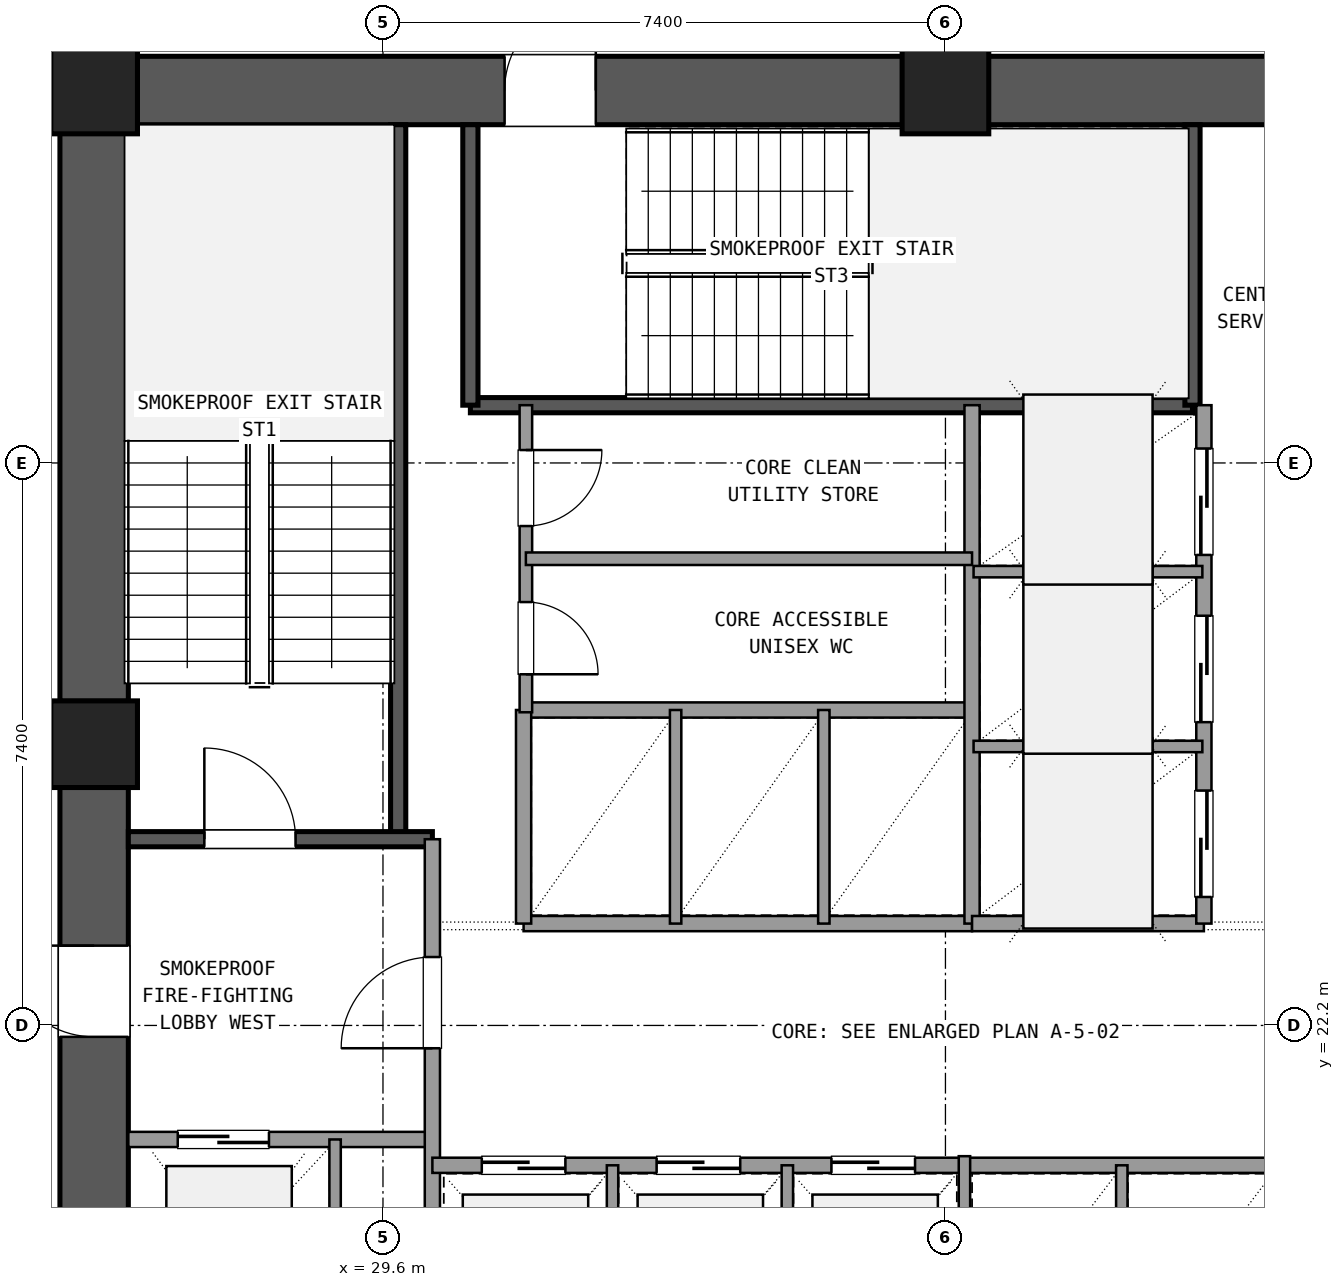
"""IFC4 building model, lengths in metres.
Left out: names, types, materials, properties, quantities, classifications, styles, units other than length and angle.
Written with IfcOpenShell. Run it as: python <this file> out.ifc"""

import sys

from ifc_helpers import new_model, si_unit, direction, frame, frame_2d, origin, origin_2d, place, context, subcontext, project, spatial, rectangle, extrude, element, fill, save


model = new_model("IFC4")
c1 = context("Model", 3, precision=1e-05, world=origin(), true_north=direction((0.0, 1.0)))
c2 = subcontext(c1, "Body", "Model", "MODEL_VIEW")
j1 = project(units=[si_unit("LENGTHUNIT", "METRE"), si_unit("PLANEANGLEUNIT", "RADIAN")], contexts=[c1])
p1 = place(None, origin())
s1 = spatial("IfcSite", under=j1, at=p1, CompositionType="ELEMENT")
p2 = place(p1, origin())
s2 = spatial("IfcBuilding", under=s1, at=p2, CompositionType="ELEMENT")
p3 = place(p2, frame((0.0, 0.0, 5.4)))
s3 = spatial("IfcBuildingStorey", under=s2, at=p3, CompositionType="ELEMENT", Elevation=5.4)
for number, where, z_axis, x_axis in (
    (1, (37.0, 34.5, 0.0), (0.0, 0.0, 1.0), (1.0, 0.0, 0.0)),
    (2, (25.8, 34.5, 0.0), (0.0, 0.0, 1.0), (1.0, 0.0, 0.0)),
    (3, (25.8, 25.9, 0.0), (0.0, 0.0, 1.0), (1.0, 0.0, 0.0)),
):
    element("IfcColumn", number, at=place(p3, frame(where, z_axis=z_axis, x_axis=x_axis)), inside=s3, PredefinedType="COLUMN", context=c2, shape_type="SweptSolid", body=[
        extrude(rectangle(XDim=1.14, YDim=1.14, at=origin_2d()), origin(), (0.0, 0.0, 1.0), 4.5),
    ])
p4 = place(p3, frame((47.635, 34.5, 0.0), z_axis=(0.0, 0.0, 1.0), x_axis=(-1.0, 0.0, 0.0)))
e4 = element("IfcWall", 4, at=p4, inside=s3, PredefinedType="SHEAR", context=c2, shape_type="SweptSolid", body=[
    extrude(rectangle(XDim=10.07, YDim=0.9, at=frame_2d((5.035, 0.0))), origin(), (0.0, 0.0, 1.0), 4.2),
])
p5 = place(p4, frame((4.535, 0.0, 0.0)))
e5 = element("IfcOpeningElement", 5, at=p5, cuts=e4, PredefinedType="OPENING", context=c2, shape_type="SweptSolid", body=[
    extrude(rectangle(XDim=1.6, YDim=2.2, at=frame_2d((0.8, 1.1))), frame((0.0, 0.46, 0.0), z_axis=(0.0, -1.0, 0.0), x_axis=(1.0, 0.0, 0.0)), (0.0, 0.0, 1.0), 0.92),
])
p6 = place(p3, frame((36.435, 34.5, 0.0), z_axis=(0.0, 0.0, 1.0), x_axis=(-1.0, 0.0, 0.0)))
e6 = element("IfcWall", 6, at=p6, inside=s3, PredefinedType="SHEAR", context=c2, shape_type="SweptSolid", body=[
    extrude(rectangle(XDim=10.07, YDim=0.9, at=frame_2d((5.035, 0.0))), origin(), (0.0, 0.0, 1.0), 4.2),
])
p7 = place(p6, frame((4.035, 0.0, 0.0)))
e7 = element("IfcOpeningElement", 7, at=p7, cuts=e6, PredefinedType="OPENING", context=c2, shape_type="SweptSolid", body=[
    extrude(rectangle(XDim=1.2, YDim=2.15, at=frame_2d((0.6, 1.075))), frame((0.0, 0.46, 0.0), z_axis=(0.0, -1.0, 0.0), x_axis=(1.0, 0.0, 0.0)), (0.0, 0.0, 1.0), 0.92),
])
p8 = place(p3, frame((25.8, 33.935, 0.0), z_axis=(0.0, 0.0, 1.0), x_axis=(0.0, -1.0, 0.0)))
e8 = element("IfcWall", 8, at=p8, inside=s3, PredefinedType="SHEAR", context=c2, shape_type="SweptSolid", body=[
    extrude(rectangle(XDim=7.47, YDim=0.9, at=frame_2d((3.735, 0.0))), origin(), (0.0, 0.0, 1.0), 4.2),
])
p9 = place(p3, frame((25.8, 25.335, 0.0), z_axis=(0.0, 0.0, 1.0), x_axis=(0.0, -1.0, 0.0)))
e9 = element("IfcWall", 9, at=p9, inside=s3, PredefinedType="SHEAR", context=c2, shape_type="SweptSolid", body=[
    extrude(rectangle(XDim=7.47, YDim=0.9, at=frame_2d((3.735, 0.0))), origin(), (0.0, 0.0, 1.0), 4.2),
])
p10 = place(p9, frame((2.085, 0.0, 0.0)))
e10 = element("IfcOpeningElement", 10, at=p10, cuts=e9, PredefinedType="OPENING", context=c2, shape_type="SweptSolid", body=[
    extrude(rectangle(XDim=1.2, YDim=2.15, at=frame_2d((0.6, 1.075))), frame((0.0, 0.46, 0.0), z_axis=(0.0, -1.0, 0.0), x_axis=(1.0, 0.0, 0.0)), (0.0, 0.0, 1.0), 0.92),
])
p11 = place(p3, frame((29.8, 24.65, 0.0), z_axis=(0.0, 0.0, 1.0), x_axis=(0.0, 1.0, 0.0)))
e11 = element("IfcWall", 11, at=p11, inside=s3, PredefinedType="SHEAR", context=c2, shape_type="SweptSolid", body=[
    extrude(rectangle(XDim=9.4, YDim=0.2, at=frame_2d((4.7, 0.0))), origin(), (0.0, 0.0, 1.0), 4.2),
])
p12 = place(p3, frame((26.25, 24.65, 0.0), z_axis=(0.0, 0.0, 1.0), x_axis=(1.0, 0.0, 0.0)))
e12 = element("IfcWall", 12, at=p12, inside=s3, PredefinedType="SHEAR", context=c2, shape_type="SweptSolid", body=[
    extrude(rectangle(XDim=4.0, YDim=0.2, at=frame_2d((2.0, 0.0))), origin(), (0.0, 0.0, 1.0), 4.2),
])
p13 = place(p12, frame((1.0, 0.0, 0.0)))
e13 = element("IfcOpeningElement", 13, at=p13, cuts=e12, PredefinedType="OPENING", context=c2, shape_type="SweptSolid", body=[
    extrude(rectangle(XDim=1.2, YDim=2.15, at=frame_2d((0.6, 1.075))), frame((0.0, 0.11, 0.0), z_axis=(0.0, -1.0, 0.0), x_axis=(1.0, 0.0, 0.0)), (0.0, 0.0, 1.0), 0.22),
])
p14 = place(p3, frame((30.75, 30.36, 0.0), z_axis=(0.0, 0.0, 1.0), x_axis=(1.0, 0.0, 0.0)))
e14 = element("IfcWall", 14, at=p14, inside=s3, PredefinedType="SHEAR", context=c2, shape_type="SweptSolid", body=[
    extrude(rectangle(XDim=9.5, YDim=0.2, at=frame_2d((4.75, 0.0))), origin(), (0.0, 0.0, 1.0), 4.2),
])
for number, where, z_axis, x_axis in (
    (15, (30.75, 30.36, 0.0), (0.0, 0.0, 1.0), (0.0, 1.0, 0.0)),
    (16, (40.25, 30.36, 0.0), (0.0, 0.0, 1.0), (0.0, 1.0, 0.0)),
):
    element("IfcWall", number, at=place(p3, frame(where, z_axis=z_axis, x_axis=x_axis)), inside=s3, PredefinedType="SHEAR", context=c2, shape_type="SweptSolid", body=[
        extrude(rectangle(XDim=3.69, YDim=0.2, at=frame_2d((1.845, 0.0))), origin(), (0.0, 0.0, 1.0), 4.2),
    ])
p15 = place(p3, frame((26.25, 20.7, 0.0), z_axis=(0.0, 0.0, 1.0), x_axis=(1.0, 0.0, 0.0)))
e17 = element("IfcWall", 17, at=p15, inside=s3, PredefinedType="SOLIDWALL", context=c2, shape_type="SweptSolid", body=[
    extrude(rectangle(XDim=4.0, YDim=0.2, at=frame_2d((2.0, 0.0))), origin(), (0.0, 0.0, 1.0), 3.21),
])
p16 = place(p15, frame((0.65, 0.0, 0.0)))
e18 = element("IfcOpeningElement", 18, at=p16, cuts=e17, PredefinedType="OPENING", context=c2, shape_type="SweptSolid", body=[
    extrude(rectangle(XDim=1.2, YDim=2.15, at=frame_2d((0.6, 1.075))), frame((0.0, 0.11, 0.0), z_axis=(0.0, -1.0, 0.0), x_axis=(1.0, 0.0, 0.0)), (0.0, 0.0, 1.0), 0.22),
])
p17 = place(p3, frame((30.25, 17.75, 0.0), z_axis=(0.0, 0.0, 1.0), x_axis=(0.0, 1.0, 0.0)))
e19 = element("IfcWall", 19, at=p17, inside=s3, PredefinedType="SOLIDWALL", context=c2, shape_type="SweptSolid", body=[
    extrude(rectangle(XDim=6.9, YDim=0.2, at=frame_2d((3.45, 0.0))), origin(), (0.0, 0.0, 1.0), 3.21),
])
p18 = place(p17, frame((4.15, 0.0, 0.0)))
e20 = element("IfcOpeningElement", 20, at=p18, cuts=e19, PredefinedType="OPENING", context=c2, shape_type="SweptSolid", body=[
    extrude(rectangle(XDim=1.2, YDim=2.15, at=frame_2d((0.6, 1.075))), frame((0.0, 0.11, 0.0), z_axis=(0.0, -1.0, 0.0), x_axis=(1.0, 0.0, 0.0)), (0.0, 0.0, 1.0), 0.22),
])
p19 = place(p3, frame((28.97, 17.75, 0.0), z_axis=(0.0, 0.0, 1.0), x_axis=(0.0, 1.0, 0.0)))
e21 = element("IfcWall", 21, at=p19, inside=s3, PredefinedType="PARTITIONING", context=c2, shape_type="SweptSolid", body=[
    extrude(rectangle(XDim=2.95, YDim=0.15, at=frame_2d((1.475, 0.0))), origin(), (0.0, 0.0, 1.0), 3.21),
])
p20 = place(p3, frame((30.25, 20.36, 0.0), z_axis=(0.0, 0.0, 1.0), x_axis=(1.0, 0.0, 0.0)))
e22 = element("IfcWall", 22, at=p20, inside=s3, PredefinedType="SOLIDWALL", context=c2, shape_type="SweptSolid", body=[
    extrude(rectangle(XDim=7.0, YDim=0.2, at=frame_2d((3.5, 0.0))), origin(), (0.0, 0.0, 1.0), 3.21),
])
p21 = place(p20, frame((0.65, 0.0, 0.0)))
e23 = element("IfcOpeningElement", 23, at=p21, cuts=e22, PredefinedType="OPENING", context=c2, shape_type="SweptSolid", body=[
    extrude(rectangle(XDim=1.1, YDim=2.15, at=frame_2d((0.55, 1.075))), frame((0.0, 0.11, 0.0), z_axis=(0.0, -1.0, 0.0), x_axis=(1.0, 0.0, 0.0)), (0.0, 0.0, 1.0), 0.22),
])
p22 = place(p20, frame((2.95, 0.0, 0.0)))
e24 = element("IfcOpeningElement", 24, at=p22, cuts=e22, PredefinedType="OPENING", context=c2, shape_type="SweptSolid", body=[
    extrude(rectangle(XDim=1.1, YDim=2.15, at=frame_2d((0.55, 1.075))), frame((0.0, 0.11, 0.0), z_axis=(0.0, -1.0, 0.0), x_axis=(1.0, 0.0, 0.0)), (0.0, 0.0, 1.0), 0.22),
])
p23 = place(p20, frame((5.25, 0.0, 0.0)))
e25 = element("IfcOpeningElement", 25, at=p23, cuts=e22, PredefinedType="OPENING", context=c2, shape_type="SweptSolid", body=[
    extrude(rectangle(XDim=1.1, YDim=2.15, at=frame_2d((0.55, 1.075))), frame((0.0, 0.11, 0.0), z_axis=(0.0, -1.0, 0.0), x_axis=(1.0, 0.0, 0.0)), (0.0, 0.0, 1.0), 0.22),
])
for number, where, z_axis, x_axis in (
    (26, (32.62, 17.75, 0.0), (0.0, 0.0, 1.0), (0.0, 1.0, 0.0)),
    (27, (34.92, 17.75, 0.0), (0.0, 0.0, 1.0), (0.0, 1.0, 0.0)),
):
    element("IfcWall", number, at=place(p3, frame(where, z_axis=z_axis, x_axis=x_axis)), inside=s3, PredefinedType="PARTITIONING", context=c2, shape_type="SweptSolid", body=[
        extrude(rectangle(XDim=2.61, YDim=0.15, at=frame_2d((1.305, 0.0))), origin(), (0.0, 0.0, 1.0), 3.21),
    ])
p24 = place(p3, frame((37.25, 20.36, 0.0), z_axis=(0.0, 0.0, 1.0), x_axis=(1.0, 0.0, 0.0)))
e28 = element("IfcWall", 28, at=p24, inside=s3, PredefinedType="SOLIDWALL", context=c2, shape_type="SweptSolid", body=[
    extrude(rectangle(XDim=6.1, YDim=0.2, at=frame_2d((3.05, 0.0))), origin(), (0.0, 0.0, 1.0), 3.21),
])
p25 = place(p3, frame((39.32, 17.75, 0.0), z_axis=(0.0, 0.0, 1.0), x_axis=(0.0, 1.0, 0.0)))
e29 = element("IfcWall", 29, at=p25, inside=s3, PredefinedType="PARTITIONING", context=c2, shape_type="SweptSolid", body=[
    extrude(rectangle(XDim=2.61, YDim=0.15, at=frame_2d((1.305, 0.0))), origin(), (0.0, 0.0, 1.0), 3.21),
])
p26 = place(p3, frame((37.25, 17.75, 0.0), z_axis=(0.0, 0.0, 1.0), x_axis=(0.0, 1.0, 0.0)))
e30 = element("IfcWall", 30, at=p26, inside=s3, PredefinedType="PARTITIONING", context=c2, shape_type="SweptSolid", body=[
    extrude(rectangle(XDim=2.73, YDim=0.15, at=frame_2d((1.365, 0.0))), origin(), (0.0, 0.0, 1.0), 3.21),
])
for number, where, z_axis, x_axis in (
    (31, (31.45, 23.54, 0.0), (0.0, 0.0, 1.0), (1.0, 0.0, 0.0)),
    (32, (31.45, 26.35, 0.0), (0.0, 0.0, 1.0), (1.0, 0.0, 0.0)),
):
    element("IfcWall", number, at=place(p3, frame(where, z_axis=z_axis, x_axis=x_axis)), inside=s3, PredefinedType="SOLIDWALL", context=c2, shape_type="SweptSolid", body=[
        extrude(rectangle(XDim=5.9, YDim=0.2, at=frame_2d((2.95, 0.0))), origin(), (0.0, 0.0, 1.0), 3.21),
    ])
p27 = place(p3, frame((31.45, 23.54, 0.0), z_axis=(0.0, 0.0, 1.0), x_axis=(0.0, 1.0, 0.0)))
e33 = element("IfcWall", 33, at=p27, inside=s3, PredefinedType="SOLIDWALL", context=c2, shape_type="SweptSolid", body=[
    extrude(rectangle(XDim=2.81, YDim=0.2, at=frame_2d((1.405, 0.0))), origin(), (0.0, 0.0, 1.0), 3.21),
])
for number, where, z_axis, x_axis in (
    (34, (33.45, 23.54, 0.0), (0.0, 0.0, 1.0), (0.0, 1.0, 0.0)),
    (35, (35.4, 23.54, 0.0), (0.0, 0.0, 1.0), (0.0, 1.0, 0.0)),
):
    element("IfcWall", number, at=place(p3, frame(where, z_axis=z_axis, x_axis=x_axis)), inside=s3, PredefinedType="PARTITIONING", context=c2, shape_type="SweptSolid", body=[
        extrude(rectangle(XDim=2.81, YDim=0.15, at=frame_2d((1.405, 0.0))), origin(), (0.0, 0.0, 1.0), 3.21),
    ])
p28 = place(p3, frame((37.35, 23.54, 0.0), z_axis=(0.0, 0.0, 1.0), x_axis=(0.0, 1.0, 0.0)))
e36 = element("IfcWall", 36, at=p28, inside=s3, PredefinedType="SOLIDWALL", context=c2, shape_type="SweptSolid", body=[
    extrude(rectangle(XDim=6.82, YDim=0.2, at=frame_2d((3.41, 0.0))), origin(), (0.0, 0.0, 1.0), 3.21),
])
p29 = place(p3, frame((37.35, 23.54, 0.0), z_axis=(0.0, 0.0, 1.0), x_axis=(1.0, 0.0, 0.0)))
e37 = element("IfcWall", 37, at=p29, inside=s3, PredefinedType="SOLIDWALL", context=c2, shape_type="SweptSolid", body=[
    extrude(rectangle(XDim=3.05, YDim=0.2, at=frame_2d((1.525, 0.0))), origin(), (0.0, 0.0, 1.0), 3.21),
])
p30 = place(p3, frame((40.4, 23.54, 0.0), z_axis=(0.0, 0.0, 1.0), x_axis=(0.0, 1.0, 0.0)))
e38 = element("IfcWall", 38, at=p30, inside=s3, PredefinedType="SOLIDWALL", context=c2, shape_type="SweptSolid", body=[
    extrude(rectangle(XDim=6.82, YDim=0.2, at=frame_2d((3.41, 0.0))), origin(), (0.0, 0.0, 1.0), 3.21),
])
p31 = place(p30, frame((0.35, 0.0, 0.0)))
e39 = element("IfcOpeningElement", 39, at=p31, cuts=e38, PredefinedType="OPENING", context=c2, shape_type="SweptSolid", body=[
    extrude(rectangle(XDim=1.4, YDim=2.2, at=frame_2d((0.7, 1.1))), frame((0.0, 0.11, 0.0), z_axis=(0.0, -1.0, 0.0), x_axis=(1.0, 0.0, 0.0)), (0.0, 0.0, 1.0), 0.22),
])
p32 = place(p30, frame((2.65, 0.0, 0.0)))
e40 = element("IfcOpeningElement", 40, at=p32, cuts=e38, PredefinedType="OPENING", context=c2, shape_type="SweptSolid", body=[
    extrude(rectangle(XDim=1.4, YDim=2.2, at=frame_2d((0.7, 1.1))), frame((0.0, 0.11, 0.0), z_axis=(0.0, -1.0, 0.0), x_axis=(1.0, 0.0, 0.0)), (0.0, 0.0, 1.0), 0.22),
])
p33 = place(p30, frame((4.85, 0.0, 0.0)))
e41 = element("IfcOpeningElement", 41, at=p33, cuts=e38, PredefinedType="OPENING", context=c2, shape_type="SweptSolid", body=[
    extrude(rectangle(XDim=1.4, YDim=2.2, at=frame_2d((0.7, 1.1))), frame((0.0, 0.11, 0.0), z_axis=(0.0, -1.0, 0.0), x_axis=(1.0, 0.0, 0.0)), (0.0, 0.0, 1.0), 0.22),
])
for number, where, z_axis, x_axis in (
    (42, (37.37, 25.87, 0.0), (0.0, 0.0, 1.0), (1.0, 0.0, 0.0)),
    (43, (37.37, 28.17, 0.0), (0.0, 0.0, 1.0), (1.0, 0.0, 0.0)),
):
    element("IfcWall", number, at=place(p3, frame(where, z_axis=z_axis, x_axis=x_axis)), inside=s3, PredefinedType="PARTITIONING", context=c2, shape_type="SweptSolid", body=[
        extrude(rectangle(XDim=3.01, YDim=0.15, at=frame_2d((1.505, 0.0))), origin(), (0.0, 0.0, 1.0), 3.21),
    ])
p34 = place(p3, frame((31.48, 26.32, 0.0), z_axis=(0.0, 0.0, 1.0), x_axis=(0.0, 1.0, 0.0)))
e44 = element("IfcWall", 44, at=p34, inside=s3, PredefinedType="PLUMBINGWALL", context=c2, shape_type="SweptSolid", body=[
    extrude(rectangle(XDim=4.04, YDim=0.165, at=frame_2d((2.02, 0.0))), origin(), (0.0, 0.0, 1.0), 3.21),
])
p35 = place(p34, frame((0.5, 0.0, 0.0)))
e45 = element("IfcOpeningElement", 45, at=p35, cuts=e44, PredefinedType="OPENING", context=c2, shape_type="SweptSolid", body=[
    extrude(rectangle(XDim=0.95, YDim=2.1, at=frame_2d((0.475, 1.05))), frame((0.0, 0.093, 0.0), z_axis=(0.0, -1.0, 0.0), x_axis=(1.0, 0.0, 0.0)), (0.0, 0.0, 1.0), 0.185),
])
p36 = place(p34, frame((2.45, 0.0, 0.0)))
e46 = element("IfcOpeningElement", 46, at=p36, cuts=e44, PredefinedType="OPENING", context=c2, shape_type="SweptSolid", body=[
    extrude(rectangle(XDim=1.0, YDim=2.15, at=frame_2d((0.5, 1.075))), frame((0.0, 0.093, 0.0), z_axis=(0.0, -1.0, 0.0), x_axis=(1.0, 0.0, 0.0)), (0.0, 0.0, 1.0), 0.185),
])
p37 = place(p3, frame((31.48, 28.34, 0.0), z_axis=(0.0, 0.0, 1.0), x_axis=(1.0, 0.0, 0.0)))
e47 = element("IfcWall", 47, at=p37, inside=s3, PredefinedType="PLUMBINGWALL", context=c2, shape_type="SweptSolid", body=[
    extrude(rectangle(XDim=5.87, YDim=0.165, at=frame_2d((2.935, 0.0))), origin(), (0.0, 0.0, 1.0), 3.21),
])
p38 = place(p13, origin())
e48 = element("IfcDoor", 48, at=p38, inside=s3, OperationType="SINGLE_SWING_LEFT", PredefinedType="DOOR", context=c2, shape_type="SweptSolid", body=[
    extrude(rectangle(XDim=1.2, YDim=2.15, at=frame_2d((0.6, 1.075))), frame((0.0, 0.025, 0.0), z_axis=(0.0, -1.0, 0.0), x_axis=(1.0, 0.0, 0.0)), (0.0, 0.0, 1.0), 0.05),
])
fill(e13, e48)
p39 = place(p16, origin())
e49 = element("IfcDoor", 49, at=p39, inside=s3, OperationType="SLIDING_TO_LEFT", PredefinedType="DOOR", context=c2, shape_type="SweptSolid", body=[
    extrude(rectangle(XDim=1.2, YDim=2.15, at=frame_2d((0.6, 1.075))), frame((0.0, 0.025, 0.0), z_axis=(0.0, -1.0, 0.0), x_axis=(1.0, 0.0, 0.0)), (0.0, 0.0, 1.0), 0.05),
])
fill(e18, e49)
p40 = place(p18, origin())
e50 = element("IfcDoor", 50, at=p40, inside=s3, OperationType="SINGLE_SWING_LEFT", PredefinedType="DOOR", context=c2, shape_type="SweptSolid", body=[
    extrude(rectangle(XDim=1.2, YDim=2.15, at=frame_2d((0.6, 1.075))), frame((0.0, 0.025, 0.0), z_axis=(0.0, -1.0, 0.0), x_axis=(1.0, 0.0, 0.0)), (0.0, 0.0, 1.0), 0.05),
])
fill(e20, e50)
p41 = place(p10, frame((1.2, 0.0, 0.0), z_axis=(0.0, 0.0, 1.0), x_axis=(-1.0, 0.0, 0.0)))
e51 = element("IfcDoor", 51, at=p41, inside=s3, OperationType="SINGLE_SWING_LEFT", PredefinedType="DOOR", context=c2, shape_type="SweptSolid", body=[
    extrude(rectangle(XDim=1.2, YDim=2.15, at=frame_2d((0.6, 1.075))), frame((0.0, 0.025, 0.0), z_axis=(0.0, -1.0, 0.0), x_axis=(1.0, 0.0, 0.0)), (0.0, 0.0, 1.0), 0.05),
])
fill(e10, e51)
p42 = place(p7, frame((1.2, 0.0, 0.0), z_axis=(0.0, 0.0, 1.0), x_axis=(-1.0, 0.0, 0.0)))
e52 = element("IfcDoor", 52, at=p42, inside=s3, OperationType="SINGLE_SWING_LEFT", PredefinedType="DOOR", context=c2, shape_type="SweptSolid", body=[
    extrude(rectangle(XDim=1.2, YDim=2.15, at=frame_2d((0.6, 1.075))), frame((0.0, 0.025, 0.0), z_axis=(0.0, -1.0, 0.0), x_axis=(1.0, 0.0, 0.0)), (0.0, 0.0, 1.0), 0.05),
])
fill(e7, e52)
p43 = place(p21, origin())
e53 = element("IfcDoor", 53, at=p43, inside=s3, OperationType="SLIDING_TO_LEFT", PredefinedType="DOOR", context=c2, shape_type="SweptSolid", body=[
    extrude(rectangle(XDim=1.1, YDim=2.15, at=frame_2d((0.55, 1.075))), frame((0.0, 0.025, 0.0), z_axis=(0.0, -1.0, 0.0), x_axis=(1.0, 0.0, 0.0)), (0.0, 0.0, 1.0), 0.05),
])
fill(e23, e53)
p44 = place(p22, origin())
e54 = element("IfcDoor", 54, at=p44, inside=s3, OperationType="SLIDING_TO_LEFT", PredefinedType="DOOR", context=c2, shape_type="SweptSolid", body=[
    extrude(rectangle(XDim=1.1, YDim=2.15, at=frame_2d((0.55, 1.075))), frame((0.0, 0.025, 0.0), z_axis=(0.0, -1.0, 0.0), x_axis=(1.0, 0.0, 0.0)), (0.0, 0.0, 1.0), 0.05),
])
fill(e24, e54)
p45 = place(p23, origin())
e55 = element("IfcDoor", 55, at=p45, inside=s3, OperationType="SLIDING_TO_LEFT", PredefinedType="DOOR", context=c2, shape_type="SweptSolid", body=[
    extrude(rectangle(XDim=1.1, YDim=2.15, at=frame_2d((0.55, 1.075))), frame((0.0, 0.025, 0.0), z_axis=(0.0, -1.0, 0.0), x_axis=(1.0, 0.0, 0.0)), (0.0, 0.0, 1.0), 0.05),
])
fill(e25, e55)
p46 = place(p31, origin())
e56 = element("IfcDoor", 56, at=p46, inside=s3, OperationType="SLIDING_TO_LEFT", PredefinedType="DOOR", context=c2, shape_type="SweptSolid", body=[
    extrude(rectangle(XDim=1.4, YDim=2.2, at=frame_2d((0.7, 1.1))), frame((0.0, 0.025, 0.0), z_axis=(0.0, -1.0, 0.0), x_axis=(1.0, 0.0, 0.0)), (0.0, 0.0, 1.0), 0.05),
])
fill(e39, e56)
p47 = place(p32, origin())
e57 = element("IfcDoor", 57, at=p47, inside=s3, OperationType="SLIDING_TO_LEFT", PredefinedType="DOOR", context=c2, shape_type="SweptSolid", body=[
    extrude(rectangle(XDim=1.4, YDim=2.2, at=frame_2d((0.7, 1.1))), frame((0.0, 0.025, 0.0), z_axis=(0.0, -1.0, 0.0), x_axis=(1.0, 0.0, 0.0)), (0.0, 0.0, 1.0), 0.05),
])
fill(e40, e57)
p48 = place(p33, origin())
e58 = element("IfcDoor", 58, at=p48, inside=s3, OperationType="SLIDING_TO_RIGHT", PredefinedType="DOOR", context=c2, shape_type="SweptSolid", body=[
    extrude(rectangle(XDim=1.4, YDim=2.2, at=frame_2d((0.7, 1.1))), frame((0.0, 0.025, 0.0), z_axis=(0.0, -1.0, 0.0), x_axis=(1.0, 0.0, 0.0)), (0.0, 0.0, 1.0), 0.05),
])
fill(e41, e58)
p49 = place(p35, frame((0.95, 0.0, 0.0), z_axis=(0.0, 0.0, 1.0), x_axis=(-1.0, 0.0, 0.0)))
e59 = element("IfcDoor", 59, at=p49, inside=s3, OperationType="SINGLE_SWING_LEFT", PredefinedType="DOOR", context=c2, shape_type="SweptSolid", body=[
    extrude(rectangle(XDim=0.95, YDim=2.1, at=frame_2d((0.475, 1.05))), frame((0.0, 0.025, 0.0), z_axis=(0.0, -1.0, 0.0), x_axis=(1.0, 0.0, 0.0)), (0.0, 0.0, 1.0), 0.05),
])
fill(e45, e59)
p50 = place(p36, frame((1.0, 0.0, 0.0), z_axis=(0.0, 0.0, 1.0), x_axis=(-1.0, 0.0, 0.0)))
e60 = element("IfcDoor", 60, at=p50, inside=s3, OperationType="SINGLE_SWING_RIGHT", PredefinedType="DOOR", context=c2, shape_type="SweptSolid", body=[
    extrude(rectangle(XDim=1.0, YDim=2.15, at=frame_2d((0.5, 1.075))), frame((0.0, 0.025, 0.0), z_axis=(0.0, -1.0, 0.0), x_axis=(1.0, 0.0, 0.0)), (0.0, 0.0, 1.0), 0.05),
])
fill(e46, e60)
save(model, sys.argv[1])
